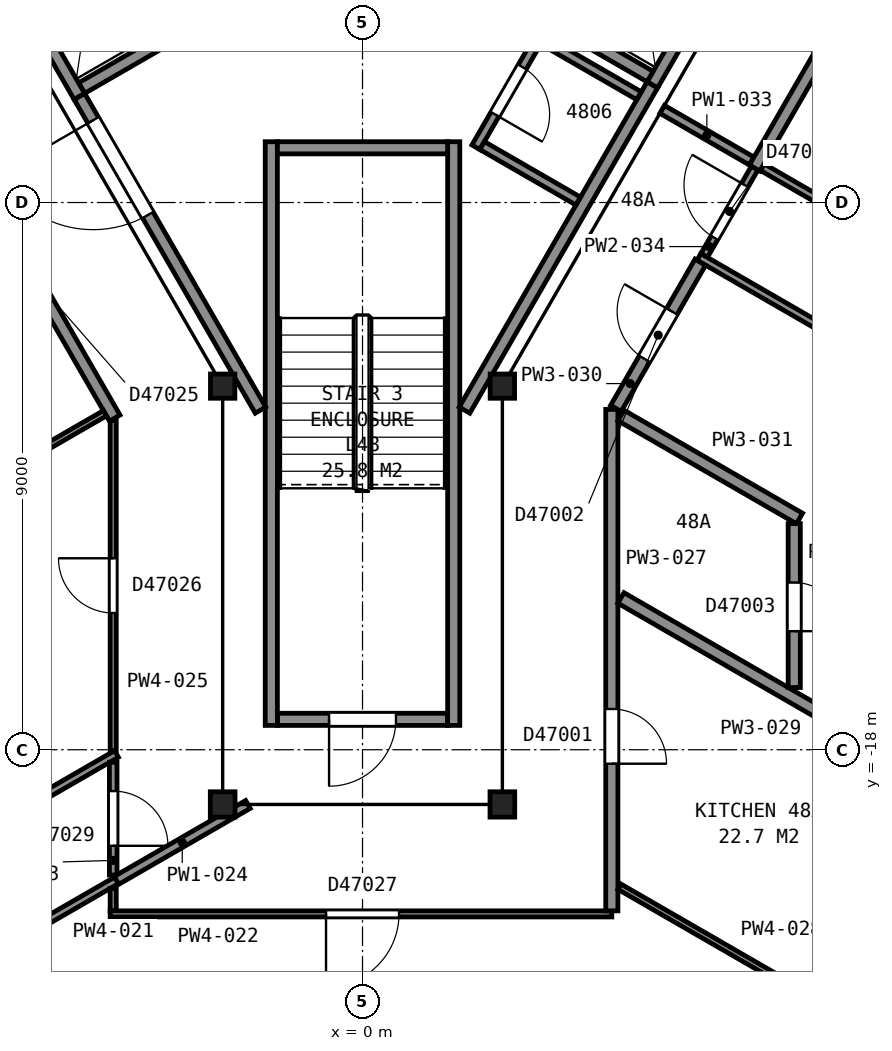
"""IFC4 building model, lengths in metres.
Left out: names, types, materials, properties, quantities, classifications, styles, units other than length and angle.
Written with IfcOpenShell. Run it as: python <this file> out.ifc"""

import sys

from ifc_helpers import new_model, si_unit, direction, frame, frame_2d, origin, origin_2d, place, context, subcontext, project, spatial, rectangle, i_section, extrude, element, fill, save


model = new_model("IFC4")
c1 = context("Model", 3, precision=1e-05, world=origin(), true_north=direction((0.0, 1.0)))
c2 = subcontext(c1, "Body", "Model", "MODEL_VIEW")
j1 = project(units=[si_unit("LENGTHUNIT", "METRE"), si_unit("PLANEANGLEUNIT", "RADIAN")], contexts=[c1])
p1 = place(None, origin())
s1 = spatial("IfcSite", under=j1, at=p1, CompositionType="ELEMENT")
p2 = place(p1, origin())
s2 = spatial("IfcBuilding", under=s1, at=p2, CompositionType="ELEMENT")
p3 = place(p2, frame((0.0, 0.0, 193.2)))
s3 = spatial("IfcBuildingStorey", under=s2, at=p3, CompositionType="ELEMENT", Elevation=193.2)
p4 = place(p3, frame((-2.3, -12.02, 0.0), z_axis=(0.0, 0.0, 1.0), x_axis=(1.0, 0.0, 0.0)))
e1 = element("IfcColumn", 1, at=p4, inside=s3, PredefinedType="COLUMN", context=c2, shape_type="SweptSolid", body=[
    extrude(i_section(OverallWidth=0.401, OverallDepth=0.399, WebThickness=0.025, FlangeThickness=0.04, FilletRadius=0.015, at=origin_2d()), origin(), (0.0, 0.0, 1.0), 3.7),
])
for number, where, z_axis, x_axis in (
    (2, (-2.3, -18.9, 0.0), (0.0, 0.0, 1.0), (-1.0, 0.0, 0.0)),
    (3, (2.3, -18.9, 0.0), (0.0, 0.0, 1.0), (-1.0, 0.0, 0.0)),
):
    element("IfcColumn", number, at=place(p3, frame(where, z_axis=z_axis, x_axis=x_axis)), inside=s3, PredefinedType="COLUMN", context=c2, shape_type="SweptSolid", body=[
        extrude(i_section(OverallWidth=0.406, OverallDepth=0.417, WebThickness=0.03, FlangeThickness=0.048, FilletRadius=0.015, at=origin_2d()), origin(), (0.0, 0.0, 1.0), 3.7),
    ])
p5 = place(p3, frame((2.3, -12.02, 0.0), z_axis=(0.0, 0.0, 1.0), x_axis=(1.0, 0.0, 0.0)))
e4 = element("IfcColumn", 4, at=p5, inside=s3, PredefinedType="COLUMN", context=c2, shape_type="SweptSolid", body=[
    extrude(i_section(OverallWidth=0.401, OverallDepth=0.399, WebThickness=0.025, FlangeThickness=0.04, FilletRadius=0.015, at=origin_2d()), origin(), (0.0, 0.0, 1.0), 3.7),
])
p6 = place(p3, frame((-1.4, -17.5, 0.0), z_axis=(0.0, 0.0, 1.0), x_axis=(1.0, 0.0, 0.0)))
e5 = element("IfcWall", 5, at=p6, inside=s3, PredefinedType="PARTITIONING", context=c2, shape_type="SweptSolid", body=[
    extrude(rectangle(XDim=2.8, YDim=0.2, at=frame_2d((1.4, 0.0))), origin(), (0.0, 0.0, 1.0), 3.45),
])
p7 = place(p6, frame((0.85, 0.0, 0.0)))
e6 = element("IfcOpeningElement", 6, at=p7, cuts=e5, PredefinedType="OPENING", context=c2, shape_type="SweptSolid", body=[
    extrude(rectangle(XDim=1.1, YDim=2.1, at=frame_2d((0.55, 1.05))), frame((0.0, 0.11, 0.0), z_axis=(0.0, -1.0, 0.0), x_axis=(1.0, 0.0, 0.0)), (0.0, 0.0, 1.0), 0.22),
])
for number, where, z_axis, x_axis in (
    (7, (1.5, -8.0, 0.0), (0.0, 0.0, 1.0), (0.0, -1.0, 0.0)),
    (8, (-1.5, -8.0, 0.0), (0.0, 0.0, 1.0), (0.0, -1.0, 0.0)),
):
    element("IfcWall", number, at=place(p3, frame(where, z_axis=z_axis, x_axis=x_axis)), inside=s3, PredefinedType="PARTITIONING", context=c2, shape_type="SweptSolid", body=[
        extrude(rectangle(XDim=9.6, YDim=0.2, at=frame_2d((4.8, 0.0))), origin(), (0.0, 0.0, 1.0), 3.45),
    ])
p8 = place(p3, frame((-1.4, -8.1, 0.0), z_axis=(0.0, 0.0, 1.0), x_axis=(1.0, 0.0, 0.0)))
e9 = element("IfcWall", 9, at=p8, inside=s3, PredefinedType="PARTITIONING", context=c2, shape_type="SweptSolid", body=[
    extrude(rectangle(XDim=2.8, YDim=0.2, at=frame_2d((1.4, 0.0))), origin(), (0.0, 0.0, 1.0), 3.45),
])
p9 = place(p3, frame((-4.62, -7.118, 0.0), z_axis=(0.0, 0.0, 1.0), x_axis=(0.866036909293, 0.499980071345, 0.0)))
e10 = element("IfcWall", 10, at=p9, inside=s3, PredefinedType="PARTITIONING", context=c2, shape_type="SweptSolid", body=[
    extrude(rectangle(XDim=1.75, YDim=0.2, at=frame_2d((0.875, 0.0))), origin(), (0.0, 0.0, 1.0), 3.7),
])
p10 = place(p3, frame((4.766, -7.065, 0.0), z_axis=(0.0, 0.0, 1.0), x_axis=(0.499948979701, 0.866054858364, 0.0)))
e11 = element("IfcWall", 11, at=p10, inside=s3, PredefinedType="PARTITIONING", context=c2, shape_type="SweptSolid", body=[
    extrude(rectangle(XDim=2.55, YDim=0.2, at=frame_2d((1.275, 0.0))), origin(), (0.0, 0.0, 1.0), 3.7),
])
p11 = place(p3, frame((-4.656, -7.255, 0.0), z_axis=(0.0, 0.0, 1.0), x_axis=(-0.499990435942, 0.866030925526, 0.0)))
e12 = element("IfcWall", 12, at=p11, inside=s3, PredefinedType="PARTITIONING", context=c2, shape_type="SweptSolid", body=[
    extrude(rectangle(XDim=2.55, YDim=0.2, at=frame_2d((1.275, 0.0))), origin(), (0.0, 0.0, 1.0), 3.7),
])
p12 = place(p3, frame((4.73, -6.928, 0.0), z_axis=(0.0, 0.0, 1.0), x_axis=(-0.866036909293, 0.499980071345, 0.0)))
e13 = element("IfcWall", 13, at=p12, inside=s3, PredefinedType="PARTITIONING", context=c2, shape_type="SweptSolid", body=[
    extrude(rectangle(XDim=1.75, YDim=0.2, at=frame_2d((0.875, 0.0))), origin(), (0.0, 0.0, 1.0), 3.7),
])
p13 = place(p3, frame((-4.655, -7.257, 0.0), z_axis=(0.0, 0.0, 1.0), x_axis=(0.499966124405, -0.866044960985, 0.0)))
e14 = element("IfcWall", 14, at=p13, inside=s3, PredefinedType="PARTITIONING", context=c2, shape_type="SweptSolid", body=[
    extrude(rectangle(XDim=5.956, YDim=0.2, at=frame_2d((2.978, 0.0))), origin(), (0.0, 0.0, 1.0), 3.45),
])
p14 = place(p13, frame((0.45, 0.0, 0.0)))
e15 = element("IfcOpeningElement", 15, at=p14, cuts=e14, PredefinedType="OPENING", context=c2, shape_type="SweptSolid", body=[
    extrude(rectangle(XDim=1.8, YDim=2.1, at=frame_2d((0.9, 1.05))), frame((0.0, 0.11, 0.0), z_axis=(0.0, -1.0, 0.0), x_axis=(1.0, 0.0, 0.0)), (0.0, 0.0, 1.0), 0.22),
])
p15 = place(p3, frame((1.677, -12.415, 0.0), z_axis=(0.0, 0.0, 1.0), x_axis=(0.500054337157, 0.865994029939, 0.0)))
e16 = element("IfcWall", 16, at=p15, inside=s3, PredefinedType="PARTITIONING", context=c2, shape_type="SweptSolid", body=[
    extrude(rectangle(XDim=6.177, YDim=0.2, at=frame_2d((3.088, 0.0))), origin(), (0.0, 0.0, 1.0), 3.45),
])
p16 = place(p3, frame((2.939, -6.229, 0.0), z_axis=(0.0, 0.0, 1.0), x_axis=(-0.499961633463, -0.866047553582, 0.0)))
e17 = element("IfcWall", 17, at=p16, inside=s3, PredefinedType="PARTITIONING", context=c2, shape_type="SweptSolid", body=[
    extrude(rectangle(XDim=2.15, YDim=0.15, at=frame_2d((1.075, 0.0))), origin(), (0.0, 0.0, 1.0), 3.45),
])
p17 = place(p16, frame((0.625, 0.0, 0.0)))
e18 = element("IfcOpeningElement", 18, at=p17, cuts=e17, PredefinedType="OPENING", context=c2, shape_type="SweptSolid", body=[
    extrude(rectangle(XDim=0.9, YDim=2.1, at=frame_2d((0.45, 1.05))), frame((0.0, 0.085, 0.0), z_axis=(0.0, -1.0, 0.0), x_axis=(1.0, 0.0, 0.0)), (0.0, 0.0, 1.0), 0.17),
])
p18 = place(p3, frame((1.967, -8.063, 0.0), z_axis=(0.0, 0.0, 1.0), x_axis=(0.865978377894, -0.500081442387, 0.0)))
e19 = element("IfcWall", 19, at=p18, inside=s3, PredefinedType="PARTITIONING", context=c2, shape_type="SweptSolid", body=[
    extrude(rectangle(XDim=1.825, YDim=0.15, at=frame_2d((0.913, 0.0))), origin(), (0.0, 0.0, 1.0), 3.45),
])
p19 = place(p3, frame((2.967, -6.332, 0.0), z_axis=(0.0, 0.0, 1.0), x_axis=(0.866036312054, -0.499981105847, 0.0)))
e20 = element("IfcWall", 20, at=p19, inside=s3, PredefinedType="PARTITIONING", context=c2, shape_type="SweptSolid", body=[
    extrude(rectangle(XDim=1.825, YDim=0.15, at=frame_2d((0.912, 0.0))), origin(), (0.0, 0.0, 1.0), 3.45),
])
p20 = place(p3, frame((-4.075, -12.545, 0.0), z_axis=(0.0, 0.0, 1.0), x_axis=(-0.499999743747, 0.866025551732, 0.0)))
e21 = element("IfcWall", 21, at=p20, inside=s3, PredefinedType="PARTITIONING", context=c2, shape_type="SweptSolid", body=[
    extrude(rectangle(XDim=17.656, YDim=0.2, at=frame_2d((8.828, 0.0))), origin(), (0.0, 0.0, 1.0), 2.713),
])
p21 = place(p20, frame((10.83, 0.0, 0.0)))
e22 = element("IfcOpeningElement", 22, at=p21, cuts=e21, PredefinedType="OPENING", context=c2, shape_type="SweptSolid", body=[
    extrude(rectangle(XDim=0.9, YDim=2.1, at=frame_2d((0.45, 1.05))), frame((0.0, 0.11, 0.0), z_axis=(0.0, -1.0, 0.0), x_axis=(1.0, 0.0, 0.0)), (0.0, 0.0, 1.0), 0.22),
])
p22 = place(p20, frame((7.148, 0.0, 0.0)))
e23 = element("IfcOpeningElement", 23, at=p22, cuts=e21, PredefinedType="OPENING", context=c2, shape_type="SweptSolid", body=[
    extrude(rectangle(XDim=0.9, YDim=2.1, at=frame_2d((0.45, 1.05))), frame((0.0, 0.11, 0.0), z_axis=(0.0, -1.0, 0.0), x_axis=(1.0, 0.0, 0.0)), (0.0, 0.0, 1.0), 0.22),
])
p23 = place(p20, frame((2.198, 0.0, 0.0)))
e24 = element("IfcOpeningElement", 24, at=p23, cuts=e21, PredefinedType="OPENING", context=c2, shape_type="SweptSolid", body=[
    extrude(rectangle(XDim=0.9, YDim=2.1, at=frame_2d((0.45, 1.05))), frame((0.0, 0.11, 0.0), z_axis=(0.0, -1.0, 0.0), x_axis=(1.0, 0.0, 0.0)), (0.0, 0.0, 1.0), 0.22),
])
p24 = place(p3, frame((-11.54, -16.682, 0.0), z_axis=(0.0, 0.0, 1.0), x_axis=(0.866063141794, 0.499934630153, 0.0)))
e25 = element("IfcWall", 25, at=p24, inside=s3, PredefinedType="PARTITIONING", context=c2, shape_type="SweptSolid", body=[
    extrude(rectangle(XDim=8.433, YDim=0.1, at=frame_2d((4.217, 0.0))), origin(), (0.0, 0.0, 1.0), 2.713),
])
p25 = place(p3, frame((-9.066, -20.968, 0.0), z_axis=(0.0, 0.0, 1.0), x_axis=(0.866023559602, 0.500003194204, 0.0)))
e26 = element("IfcWall", 26, at=p25, inside=s3, PredefinedType="PARTITIONING", context=c2, shape_type="SweptSolid", body=[
    extrude(rectangle(XDim=5.796, YDim=0.125, at=frame_2d((2.898, 0.0))), origin(), (0.0, 0.0, 1.0), 2.713),
])
p26 = place(p3, frame((-8.166, -22.527, 0.0), z_axis=(0.0, 0.0, 1.0), x_axis=(0.866042865666, 0.499969753915, 0.0)))
e27 = element("IfcWall", 27, at=p26, inside=s3, PredefinedType="PARTITIONING", context=c2, shape_type="SweptSolid", body=[
    extrude(rectangle(XDim=4.757, YDim=0.125, at=frame_2d((2.378, 0.0))), origin(), (0.0, 0.0, 1.0), 2.713),
])
p27 = place(p3, frame((-4.1, -20.65, 0.0), z_axis=(0.0, 0.0, 1.0), x_axis=(0.0, 1.0, 0.0)))
e28 = element("IfcWall", 28, at=p27, inside=s3, PredefinedType="PARTITIONING", context=c2, shape_type="SweptSolid", body=[
    extrude(rectangle(XDim=0.37, YDim=0.1, at=frame_2d((0.185, 0.0))), origin(), (0.0, 0.0, 1.0), 2.713),
])
p28 = place(p3, frame((4.1, -20.7, 0.0), z_axis=(0.0, 0.0, 1.0), x_axis=(-1.0, 0.0, 0.0)))
e29 = element("IfcWall", 29, at=p28, inside=s3, PredefinedType="PARTITIONING", context=c2, shape_type="SweptSolid", body=[
    extrude(rectangle(XDim=8.25, YDim=0.1, at=frame_2d((4.125, 0.0))), origin(), (0.0, 0.0, 1.0), 2.713),
])
p29 = place(p28, frame((3.5, 0.0, 0.0)))
e30 = element("IfcOpeningElement", 30, at=p29, cuts=e29, PredefinedType="OPENING", context=c2, shape_type="SweptSolid", body=[
    extrude(rectangle(XDim=1.2, YDim=2.1, at=frame_2d((0.6, 1.05))), frame((0.0, 0.06, 0.0), z_axis=(0.0, -1.0, 0.0), x_axis=(1.0, 0.0, 0.0)), (0.0, 0.0, 1.0), 0.12),
])
p30 = place(p3, frame((-4.1, -18.206, 0.0), z_axis=(0.0, 0.0, 1.0), x_axis=(0.0, -1.0, 0.0)))
e31 = element("IfcWall", 31, at=p30, inside=s3, PredefinedType="PARTITIONING", context=c2, shape_type="SweptSolid", body=[
    extrude(rectangle(XDim=1.854, YDim=0.125, at=frame_2d((0.927, 0.0))), origin(), (0.0, 0.0, 1.0), 2.713),
])
p31 = place(p30, frame((0.474, 0.0, 0.0)))
e32 = element("IfcOpeningElement", 32, at=p31, cuts=e31, PredefinedType="OPENING", context=c2, shape_type="SweptSolid", body=[
    extrude(rectangle(XDim=0.9, YDim=2.1, at=frame_2d((0.45, 1.05))), frame((0.0, 0.073, 0.0), z_axis=(0.0, -1.0, 0.0), x_axis=(1.0, 0.0, 0.0)), (0.0, 0.0, 1.0), 0.145),
])
p32 = place(p3, frame((-4.046, -20.149, 0.0), z_axis=(0.0, 0.0, 1.0), x_axis=(0.865916841101, 0.500187988959, 0.0)))
e33 = element("IfcWall", 33, at=p32, inside=s3, PredefinedType="PARTITIONING", context=c2, shape_type="SweptSolid", body=[
    extrude(rectangle(XDim=2.497, YDim=0.15, at=frame_2d((1.248, 0.0))), origin(), (0.0, 0.0, 1.0), 2.713),
])
p33 = place(p3, frame((-4.1, -18.016, 0.0), z_axis=(0.0, 0.0, 1.0), x_axis=(0.0, 1.0, 0.0)))
e34 = element("IfcWall", 34, at=p33, inside=s3, PredefinedType="PARTITIONING", context=c2, shape_type="SweptSolid", body=[
    extrude(rectangle(XDim=5.429, YDim=0.1, at=frame_2d((2.715, 0.0))), origin(), (0.0, 0.0, 1.0), 2.713),
])
p34 = place(p33, frame((2.265, 0.0, 0.0)))
e35 = element("IfcOpeningElement", 35, at=p34, cuts=e34, PredefinedType="OPENING", context=c2, shape_type="SweptSolid", body=[
    extrude(rectangle(XDim=0.9, YDim=2.1, at=frame_2d((0.45, 1.05))), frame((0.0, 0.06, 0.0), z_axis=(0.0, -1.0, 0.0), x_axis=(1.0, 0.0, 0.0)), (0.0, 0.0, 1.0), 0.12),
])
p35 = place(p3, frame((4.1, -12.402, 0.0), z_axis=(0.0, 0.0, 1.0), x_axis=(0.0, -1.0, 0.0)))
e36 = element("IfcWall", 36, at=p35, inside=s3, PredefinedType="PARTITIONING", context=c2, shape_type="SweptSolid", body=[
    extrude(rectangle(XDim=8.248, YDim=0.2, at=frame_2d((4.124, 0.0))), origin(), (0.0, 0.0, 1.0), 2.713),
])
p36 = place(p35, frame((4.928, 0.0, 0.0)))
e37 = element("IfcOpeningElement", 37, at=p36, cuts=e36, PredefinedType="OPENING", context=c2, shape_type="SweptSolid", body=[
    extrude(rectangle(XDim=0.9, YDim=2.1, at=frame_2d((0.45, 1.05))), frame((0.0, 0.11, 0.0), z_axis=(0.0, -1.0, 0.0), x_axis=(1.0, 0.0, 0.0)), (0.0, 0.0, 1.0), 0.22),
])
p37 = place(p3, frame((4.225, -20.252, 0.0), z_axis=(0.0, 0.0, 1.0), x_axis=(0.866048884701, -0.499959327653, 0.0)))
e38 = element("IfcWall", 38, at=p37, inside=s3, PredefinedType="PARTITIONING", context=c2, shape_type="SweptSolid", body=[
    extrude(rectangle(XDim=4.55, YDim=0.1, at=frame_2d((2.275, 0.0))), origin(), (0.0, 0.0, 1.0), 2.713),
])
p38 = place(p3, frame((4.25, -15.504, 0.0), z_axis=(0.0, 0.0, 1.0), x_axis=(0.866025383743, -0.500000034713, 0.0)))
e39 = element("IfcWall", 39, at=p38, inside=s3, PredefinedType="PARTITIONING", context=c2, shape_type="SweptSolid", body=[
    extrude(rectangle(XDim=6.903, YDim=0.2, at=frame_2d((3.451, 0.0))), origin(), (0.0, 0.0, 1.0), 2.713),
])
p39 = place(p3, frame((5.556, -9.98, 0.0), z_axis=(0.0, 0.0, 1.0), x_axis=(-0.499940639567, -0.866059672834, 0.0)))
e40 = element("IfcWall", 40, at=p39, inside=s3, PredefinedType="PARTITIONING", context=c2, shape_type="SweptSolid", body=[
    extrude(rectangle(XDim=2.777, YDim=0.2, at=frame_2d((1.388, 0.0))), origin(), (0.0, 0.0, 1.0), 2.713),
])
p40 = place(p39, frame((0.937, 0.0, 0.0)))
e41 = element("IfcOpeningElement", 41, at=p40, cuts=e40, PredefinedType="OPENING", context=c2, shape_type="SweptSolid", body=[
    extrude(rectangle(XDim=0.9, YDim=2.1, at=frame_2d((0.45, 1.05))), frame((0.0, 0.11, 0.0), z_axis=(0.0, -1.0, 0.0), x_axis=(1.0, 0.0, 0.0)), (0.0, 0.0, 1.0), 0.22),
])
p41 = place(p3, frame((4.25, -12.502, 0.0), z_axis=(0.0, 0.0, 1.0), x_axis=(0.866032087317, -0.499988423603, 0.0)))
e42 = element("IfcWall", 42, at=p41, inside=s3, PredefinedType="PARTITIONING", context=c2, shape_type="SweptSolid", body=[
    extrude(rectangle(XDim=3.39, YDim=0.2, at=frame_2d((1.695, 0.0))), origin(), (0.0, 0.0, 1.0), 2.713),
])
p42 = place(p3, frame((4.928, -7.468, 0.0), z_axis=(0.0, 0.0, 1.0), x_axis=(0.866075426483, -0.499913348133, 0.0)))
e43 = element("IfcWall", 43, at=p42, inside=s3, PredefinedType="PARTITIONING", context=c2, shape_type="SweptSolid", body=[
    extrude(rectangle(XDim=1.698, YDim=0.15, at=frame_2d((0.849, 0.0))), origin(), (0.0, 0.0, 1.0), 2.713),
])
p43 = place(p3, frame((5.62, -9.87, 0.0), z_axis=(0.0, 0.0, 1.0), x_axis=(0.500142759665, 0.865942965763, 0.0)))
e44 = element("IfcWall", 44, at=p43, inside=s3, PredefinedType="PARTITIONING", context=c2, shape_type="SweptSolid", body=[
    extrude(rectangle(XDim=1.659, YDim=0.125, at=frame_2d((0.83, 0.0))), origin(), (0.0, 0.0, 1.0), 2.713),
])
p44 = place(p43, frame((0.335, 0.0, 0.0)))
e45 = element("IfcOpeningElement", 45, at=p44, cuts=e44, PredefinedType="OPENING", context=c2, shape_type="SweptSolid", body=[
    extrude(rectangle(XDim=1.0, YDim=2.1, at=frame_2d((0.5, 1.05))), frame((0.0, 0.073, 0.0), z_axis=(0.0, -1.0, 0.0), x_axis=(1.0, 0.0, 0.0)), (0.0, 0.0, 1.0), 0.145),
])
p45 = place(p3, frame((5.533, -9.895, 0.0), z_axis=(0.0, 0.0, 1.0), x_axis=(0.865995449608, -0.500051878567, 0.0)))
e46 = element("IfcWall", 46, at=p45, inside=s3, PredefinedType="PARTITIONING", context=c2, shape_type="SweptSolid", body=[
    extrude(rectangle(XDim=8.596, YDim=0.125, at=frame_2d((4.298, 0.0))), origin(), (0.0, 0.0, 1.0), 2.713),
])
p46 = place(p3, frame((12.903, 2.745, 0.0), z_axis=(0.0, 0.0, 1.0), x_axis=(-0.499992063946, -0.866029985619, 0.0)))
e47 = element("IfcWall", 47, at=p46, inside=s3, PredefinedType="PARTITIONING", context=c2, shape_type="SweptSolid", body=[
    extrude(rectangle(XDim=12.907, YDim=0.2, at=frame_2d((6.454, 0.0))), origin(), (0.0, 0.0, 1.0), 2.713),
])
p47 = place(p46, frame((9.032, 0.0, 0.0)))
e48 = element("IfcOpeningElement", 48, at=p47, cuts=e47, PredefinedType="OPENING", context=c2, shape_type="SweptSolid", body=[
    extrude(rectangle(XDim=0.9, YDim=2.1, at=frame_2d((0.45, 1.05))), frame((0.0, 0.11, 0.0), z_axis=(0.0, -1.0, 0.0), x_axis=(1.0, 0.0, 0.0)), (0.0, 0.0, 1.0), 0.22),
])
p48 = place(p46, frame((5.349, 0.0, 0.0)))
e49 = element("IfcOpeningElement", 49, at=p48, cuts=e47, PredefinedType="OPENING", context=c2, shape_type="SweptSolid", body=[
    extrude(rectangle(XDim=0.9, YDim=2.1, at=frame_2d((0.45, 1.05))), frame((0.0, 0.11, 0.0), z_axis=(0.0, -1.0, 0.0), x_axis=(1.0, 0.0, 0.0)), (0.0, 0.0, 1.0), 0.22),
])
p49 = place(p3, frame((6.576, -8.419, 0.0), z_axis=(0.0, 0.0, 1.0), x_axis=(0.866048155274, -0.499960591193, 0.0)))
e50 = element("IfcWall", 50, at=p49, inside=s3, PredefinedType="PARTITIONING", context=c2, shape_type="SweptSolid", body=[
    extrude(rectangle(XDim=8.431, YDim=0.125, at=frame_2d((4.215, 0.0))), origin(), (0.0, 0.0, 1.0), 2.713),
])
p50 = place(p3, frame((7.1, -16.977, 0.0), z_axis=(0.0, 0.0, 1.0), x_axis=(0.0, 1.0, 0.0)))
e51 = element("IfcWall", 51, at=p50, inside=s3, PredefinedType="PARTITIONING", context=c2, shape_type="SweptSolid", body=[
    extrude(rectangle(XDim=2.695, YDim=0.2, at=frame_2d((1.347, 0.0))), origin(), (0.0, 0.0, 1.0), 2.713),
])
p51 = place(p50, frame((0.927, 0.0, 0.0)))
e52 = element("IfcOpeningElement", 52, at=p51, cuts=e51, PredefinedType="OPENING", context=c2, shape_type="SweptSolid", body=[
    extrude(rectangle(XDim=0.8, YDim=2.1, at=frame_2d((0.4, 1.05))), frame((0.0, 0.11, 0.0), z_axis=(0.0, -1.0, 0.0), x_axis=(1.0, 0.0, 0.0)), (0.0, 0.0, 1.0), 0.22),
])
p52 = place(p7, origin())
e53 = element("IfcDoor", 53, at=p52, inside=s3, OperationType="SINGLE_SWING_LEFT", PredefinedType="DOOR", context=c2, shape_type="SweptSolid", body=[
    extrude(rectangle(XDim=1.1, YDim=2.1, at=frame_2d((0.55, 1.05))), frame((0.0, 0.025, 0.0), z_axis=(0.0, -1.0, 0.0), x_axis=(1.0, 0.0, 0.0)), (0.0, 0.0, 1.0), 0.05),
])
fill(e6, e53)
p53 = place(p14, origin())
e54 = element("IfcDoor", 54, at=p53, inside=s3, OperationType="DOUBLE_DOOR_SINGLE_SWING", PredefinedType="DOOR", context=c2, shape_type="SweptSolid", body=[
    extrude(rectangle(XDim=1.8, YDim=2.1, at=frame_2d((0.9, 1.05))), frame((0.0, 0.025, 0.0), z_axis=(0.0, -1.0, 0.0), x_axis=(1.0, 0.0, 0.0)), (0.0, 0.0, 1.0), 0.05),
])
fill(e15, e54)
p54 = place(p17, origin())
e55 = element("IfcDoor", 55, at=p54, inside=s3, OperationType="SINGLE_SWING_RIGHT", PredefinedType="DOOR", context=c2, shape_type="SweptSolid", body=[
    extrude(rectangle(XDim=0.9, YDim=2.1, at=frame_2d((0.45, 1.05))), frame((0.0, 0.025, 0.0), z_axis=(0.0, -1.0, 0.0), x_axis=(1.0, 0.0, 0.0)), (0.0, 0.0, 1.0), 0.05),
])
fill(e18, e55)
p55 = place(p29, origin())
e56 = element("IfcDoor", 56, at=p55, inside=s3, OperationType="SINGLE_SWING_RIGHT", PredefinedType="DOOR", context=c2, shape_type="SweptSolid", body=[
    extrude(rectangle(XDim=1.2, YDim=2.1, at=frame_2d((0.6, 1.05))), frame((0.0, 0.025, 0.0), z_axis=(0.0, -1.0, 0.0), x_axis=(1.0, 0.0, 0.0)), (0.0, 0.0, 1.0), 0.05),
])
fill(e30, e56)
p56 = place(p31, origin())
e57 = element("IfcDoor", 57, at=p56, inside=s3, OperationType="SINGLE_SWING_RIGHT", PredefinedType="DOOR", context=c2, shape_type="SweptSolid", body=[
    extrude(rectangle(XDim=0.9, YDim=2.1, at=frame_2d((0.45, 1.05))), frame((0.0, 0.025, 0.0), z_axis=(0.0, -1.0, 0.0), x_axis=(1.0, 0.0, 0.0)), (0.0, 0.0, 1.0), 0.05),
])
fill(e32, e57)
p57 = place(p34, origin())
e58 = element("IfcDoor", 58, at=p57, inside=s3, OperationType="SINGLE_SWING_RIGHT", PredefinedType="DOOR", context=c2, shape_type="SweptSolid", body=[
    extrude(rectangle(XDim=0.9, YDim=2.1, at=frame_2d((0.45, 1.05))), frame((0.0, 0.025, 0.0), z_axis=(0.0, -1.0, 0.0), x_axis=(1.0, 0.0, 0.0)), (0.0, 0.0, 1.0), 0.05),
])
fill(e35, e58)
p58 = place(p36, origin())
e59 = element("IfcDoor", 59, at=p58, inside=s3, OperationType="SINGLE_SWING_RIGHT", PredefinedType="DOOR", context=c2, shape_type="SweptSolid", body=[
    extrude(rectangle(XDim=0.9, YDim=2.1, at=frame_2d((0.45, 1.05))), frame((0.0, 0.025, 0.0), z_axis=(0.0, -1.0, 0.0), x_axis=(1.0, 0.0, 0.0)), (0.0, 0.0, 1.0), 0.05),
])
fill(e37, e59)
p59 = place(p40, origin())
e60 = element("IfcDoor", 60, at=p59, inside=s3, OperationType="SINGLE_SWING_LEFT", PredefinedType="DOOR", context=c2, shape_type="SweptSolid", body=[
    extrude(rectangle(XDim=0.9, YDim=2.1, at=frame_2d((0.45, 1.05))), frame((0.0, 0.025, 0.0), z_axis=(0.0, -1.0, 0.0), x_axis=(1.0, 0.0, 0.0)), (0.0, 0.0, 1.0), 0.05),
])
fill(e41, e60)
p60 = place(p44, origin())
e61 = element("IfcDoor", 61, at=p60, inside=s3, OperationType="SINGLE_SWING_RIGHT", PredefinedType="DOOR", context=c2, shape_type="SweptSolid", body=[
    extrude(rectangle(XDim=1.0, YDim=2.1, at=frame_2d((0.5, 1.05))), frame((0.0, 0.025, 0.0), z_axis=(0.0, -1.0, 0.0), x_axis=(1.0, 0.0, 0.0)), (0.0, 0.0, 1.0), 0.05),
])
fill(e45, e61)
p61 = place(p51, origin())
e62 = element("IfcDoor", 62, at=p61, inside=s3, OperationType="SINGLE_SWING_LEFT", PredefinedType="DOOR", context=c2, shape_type="SweptSolid", body=[
    extrude(rectangle(XDim=0.8, YDim=2.1, at=frame_2d((0.4, 1.05))), frame((0.0, 0.025, 0.0), z_axis=(0.0, -1.0, 0.0), x_axis=(1.0, 0.0, 0.0)), (0.0, 0.0, 1.0), 0.05),
])
fill(e52, e62)
save(model, sys.argv[1])
